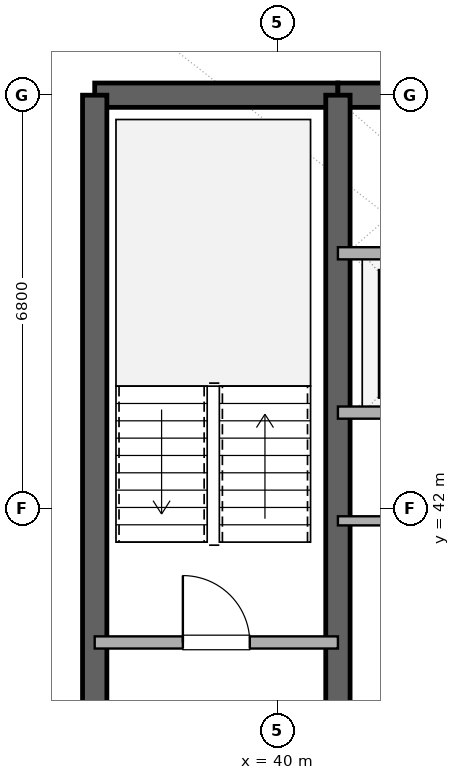
"""IFC4 building model, lengths in metres.
Left out: names, types, materials, properties, quantities, classifications, styles, units other than length and angle.
Written with IfcOpenShell. Run it as: python <this file> out.ifc"""

import sys

from ifc_helpers import new_model, si_unit, direction, frame, frame_2d, origin, place, context, subcontext, project, spatial, rectangle, extrude, element, fill, save


model = new_model("IFC4")
c1 = context("Model", 3, precision=1e-05, world=origin(), true_north=direction((0.0, 1.0)))
c2 = subcontext(c1, "Body", "Model", "MODEL_VIEW")
j1 = project(units=[si_unit("LENGTHUNIT", "METRE"), si_unit("PLANEANGLEUNIT", "RADIAN")], contexts=[c1])
p1 = place(None, origin())
s1 = spatial("IfcSite", under=j1, at=p1, CompositionType="ELEMENT")
p2 = place(p1, origin())
s2 = spatial("IfcBuilding", under=s1, at=p2, CompositionType="ELEMENT")
p3 = place(p2, frame((0.0, 0.0, 217.2)))
s3 = spatial("IfcBuildingStorey", under=s2, at=p3, CompositionType="ELEMENT", Elevation=217.2)
p4 = place(p3, frame((37.0, 48.8, 0.0), z_axis=(0.0, 0.0, 1.0), x_axis=(1.0, 0.0, 0.0)))
e1 = element("IfcWall", 1, at=p4, inside=s3, PredefinedType="SHEAR", context=c2, shape_type="SweptSolid", body=[
    extrude(rectangle(XDim=4.0, YDim=0.4, at=frame_2d((2.0, 0.0))), origin(), (0.0, 0.0, 1.0), 3.36),
])
p5 = place(p3, frame((41.0, 48.8, 0.0), z_axis=(0.0, 0.0, 1.0), x_axis=(1.0, 0.0, 0.0)))
e2 = element("IfcWall", 2, at=p5, inside=s3, PredefinedType="SHEAR", context=c2, shape_type="SweptSolid", body=[
    extrude(rectangle(XDim=14.0, YDim=0.4, at=frame_2d((7.0, 0.0))), origin(), (0.0, 0.0, 1.0), 3.36),
])
p6 = place(p5, frame((6.1, 0.0, 0.0)))
e3 = element("IfcOpeningElement", 3, at=p6, cuts=e2, PredefinedType="OPENING", context=c2, shape_type="SweptSolid", body=[
    extrude(rectangle(XDim=1.8, YDim=2.25, at=frame_2d((0.9, 1.125))), frame((0.0, 0.21, 0.0), z_axis=(0.0, -1.0, 0.0), x_axis=(1.0, 0.0, 0.0)), (0.0, 0.0, 1.0), 0.42),
])
p7 = place(p3, frame((37.0, 35.2, 0.0), z_axis=(0.0, 0.0, 1.0), x_axis=(0.0, 1.0, 0.0)))
e4 = element("IfcWall", 4, at=p7, inside=s3, PredefinedType="SHEAR", context=c2, shape_type="SweptSolid", body=[
    extrude(rectangle(XDim=13.6, YDim=0.4, at=frame_2d((6.8, 0.0))), origin(), (0.0, 0.0, 1.0), 3.36),
])
p8 = place(p3, frame((41.0, 35.2, 0.0), z_axis=(0.0, 0.0, 1.0), x_axis=(0.0, 1.0, 0.0)))
e5 = element("IfcWall", 5, at=p8, inside=s3, PredefinedType="SHEAR", context=c2, shape_type="SweptSolid", body=[
    extrude(rectangle(XDim=13.6, YDim=0.4, at=frame_2d((6.8, 0.0))), origin(), (0.0, 0.0, 1.0), 3.36),
])
p9 = place(p8, frame((1.15, 0.0, 0.0)))
e6 = element("IfcOpeningElement", 6, at=p9, cuts=e5, PredefinedType="OPENING", context=c2, shape_type="SweptSolid", body=[
    extrude(rectangle(XDim=1.1, YDim=2.2, at=frame_2d((0.55, 1.1))), frame((0.0, 0.21, 0.0), z_axis=(0.0, -1.0, 0.0), x_axis=(1.0, 0.0, 0.0)), (0.0, 0.0, 1.0), 0.42),
])
p10 = place(p3, frame((37.0, 39.8, 0.0), z_axis=(0.0, 0.0, 1.0), x_axis=(1.0, 0.0, 0.0)))
e7 = element("IfcWall", 7, at=p10, inside=s3, PredefinedType="SOLIDWALL", context=c2, shape_type="SweptSolid", body=[
    extrude(rectangle(XDim=4.0, YDim=0.2, at=frame_2d((2.0, 0.0))), origin(), (0.0, 0.0, 1.0), 2.72),
])
p11 = place(p10, frame((1.45, 0.0, 0.0)))
e8 = element("IfcOpeningElement", 8, at=p11, cuts=e7, PredefinedType="OPENING", context=c2, shape_type="SweptSolid", body=[
    extrude(rectangle(XDim=1.1, YDim=2.15, at=frame_2d((0.55, 1.075))), frame((0.0, 0.11, 0.0), z_axis=(0.0, -1.0, 0.0), x_axis=(1.0, 0.0, 0.0)), (0.0, 0.0, 1.0), 0.22),
])
for number, where, z_axis, x_axis in (
    (9, (41.0, 46.2, 0.0), (0.0, 0.0, 1.0), (1.0, 0.0, 0.0)),
    (10, (41.0, 43.58, 0.0), (0.0, 0.0, 1.0), (1.0, 0.0, 0.0)),
):
    element("IfcWall", number, at=place(p3, frame(where, z_axis=z_axis, x_axis=x_axis)), inside=s3, PredefinedType="SOLIDWALL", context=c2, shape_type="SweptSolid", body=[
        extrude(rectangle(XDim=2.95, YDim=0.2, at=frame_2d((1.475, 0.0))), origin(), (0.0, 0.0, 1.0), 2.72),
    ])
p12 = place(p3, frame((41.0, 41.8, 0.0), z_axis=(0.0, 0.0, 1.0), x_axis=(1.0, 0.0, 0.0)))
e11 = element("IfcWall", 11, at=p12, inside=s3, PredefinedType="PARTITIONING", context=c2, shape_type="SweptSolid", body=[
    extrude(rectangle(XDim=4.6, YDim=0.15, at=frame_2d((2.3, 0.0))), origin(), (0.0, 0.0, 1.0), 2.72),
])
p13 = place(p11, origin())
e12 = element("IfcDoor", 12, at=p13, inside=s3, OperationType="SINGLE_SWING_LEFT", PredefinedType="DOOR", context=c2, shape_type="SweptSolid", body=[
    extrude(rectangle(XDim=1.1, YDim=2.15, at=frame_2d((0.55, 1.075))), frame((0.0, 0.025, 0.0), z_axis=(0.0, -1.0, 0.0), x_axis=(1.0, 0.0, 0.0)), (0.0, 0.0, 1.0), 0.05),
])
fill(e8, e12)
save(model, sys.argv[1])
